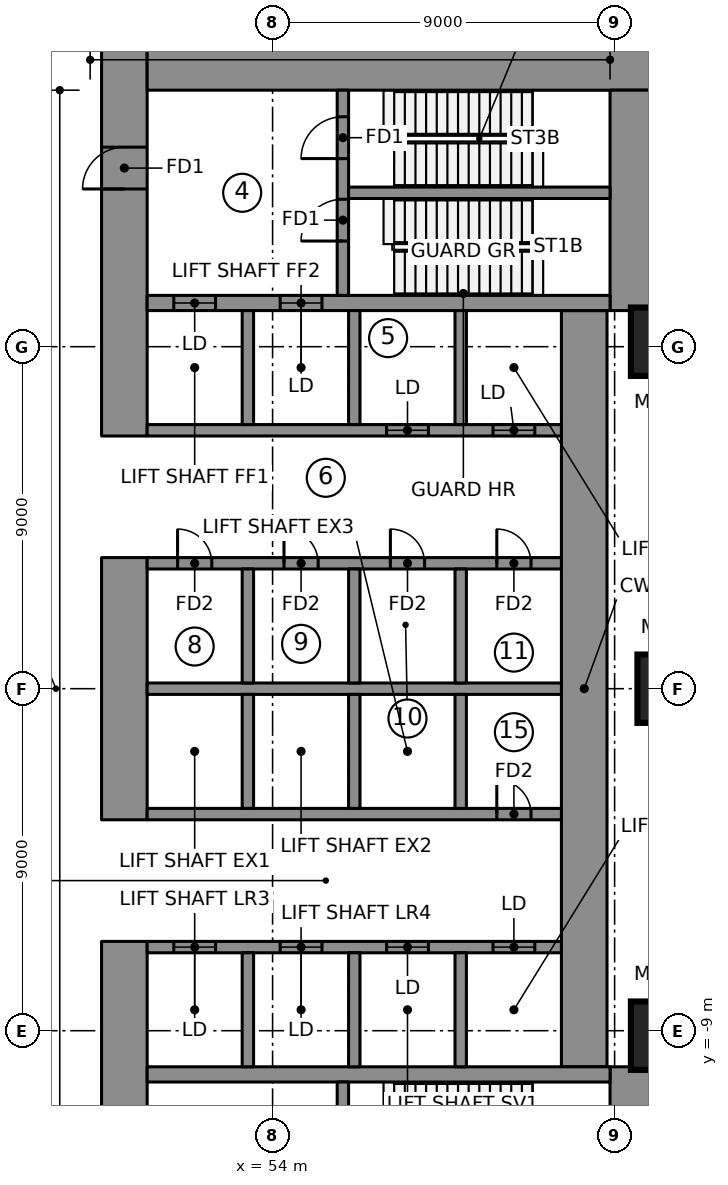
"""IFC4 building model, lengths in metres.
Left out: names, types, materials, properties, quantities, classifications, styles, units other than length and angle.
Written with IfcOpenShell. Run it as: python <this file> out.ifc"""

import sys

from ifc_helpers import new_model, si_unit, direction, frame, frame_2d, origin, origin_2d, place, context, subcontext, project, spatial, rectangle, extrude, element, fill, save


model = new_model("IFC4")
c1 = context("Model", 3, precision=1e-05, world=origin(), true_north=direction((0.0, 1.0)))
c2 = subcontext(c1, "Body", "Model", "MODEL_VIEW")
j1 = project(units=[si_unit("LENGTHUNIT", "METRE"), si_unit("PLANEANGLEUNIT", "RADIAN")], contexts=[c1])
p1 = place(None, origin())
s1 = spatial("IfcSite", under=j1, at=p1, CompositionType="ELEMENT")
p2 = place(p1, origin())
s2 = spatial("IfcBuilding", under=s1, at=p2, CompositionType="ELEMENT")
p3 = place(p2, frame((0.0, 0.0, 24.0)))
s3 = spatial("IfcBuildingStorey", under=s2, at=p3, CompositionType="ELEMENT", Elevation=24.0)
p4 = place(p3, frame((50.1, 6.65, 0.0), z_axis=(0.0, 0.0, 1.0), x_axis=(0.0, 1.0, 0.0)))
e1 = element("IfcWall", 1, at=p4, inside=s3, PredefinedType="SHEAR", context=c2, shape_type="SweptSolid", body=[
    extrude(rectangle(XDim=10.3, YDim=1.2, at=frame_2d((5.15, 0.0))), origin(), (0.0, 0.0, 1.0), 5.0),
])
p5 = place(p4, frame((6.5, 0.0, 0.0)))
e2 = element("IfcOpeningElement", 2, at=p5, cuts=e1, PredefinedType="OPENING", context=c2, shape_type="SweptSolid", body=[
    extrude(rectangle(XDim=1.1, YDim=2.1, at=frame_2d((0.55, 1.05))), frame((0.0, 0.61, 0.0), z_axis=(0.0, -1.0, 0.0), x_axis=(1.0, 0.0, 0.0)), (0.0, 0.0, 1.0), 1.22),
])
p6 = place(p3, frame((50.1, -3.45, 0.0), z_axis=(0.0, 0.0, 1.0), x_axis=(0.0, 1.0, 0.0)))
e3 = element("IfcWall", 3, at=p6, inside=s3, PredefinedType="SHEAR", context=c2, shape_type="SweptSolid", body=[
    extrude(rectangle(XDim=6.9, YDim=1.2, at=frame_2d((3.45, 0.0))), origin(), (0.0, 0.0, 1.0), 5.0),
])
p7 = place(p3, frame((50.1, -16.95, 0.0), z_axis=(0.0, 0.0, 1.0), x_axis=(0.0, 1.0, 0.0)))
e4 = element("IfcWall", 4, at=p7, inside=s3, PredefinedType="SHEAR", context=c2, shape_type="SweptSolid", body=[
    extrude(rectangle(XDim=10.3, YDim=1.2, at=frame_2d((5.15, 0.0))), origin(), (0.0, 0.0, 1.0), 5.0),
])
p8 = place(p7, frame((2.7, 0.0, 0.0)))
e5 = element("IfcOpeningElement", 5, at=p8, cuts=e4, PredefinedType="OPENING", context=c2, shape_type="SweptSolid", body=[
    extrude(rectangle(XDim=1.1, YDim=2.1, at=frame_2d((0.55, 1.05))), frame((0.0, 0.61, 0.0), z_axis=(0.0, -1.0, 0.0), x_axis=(1.0, 0.0, 0.0)), (0.0, 0.0, 1.0), 1.22),
])
p9 = place(p3, frame((50.7, 16.35, 0.0), z_axis=(0.0, 0.0, 1.0), x_axis=(1.0, 0.0, 0.0)))
e6 = element("IfcWall", 6, at=p9, inside=s3, PredefinedType="SHEAR", context=c2, shape_type="SweptSolid", body=[
    extrude(rectangle(XDim=13.38, YDim=1.2, at=frame_2d((6.69, 0.0))), origin(), (0.0, 0.0, 1.0), 5.0),
])
for number, where, z_axis, x_axis in (
    (7, (63.48, 9.95, 0.0), (0.0, 0.0, 1.0), (0.0, 1.0, 0.0)),
    (8, (63.48, -15.75, 0.0), (0.0, 0.0, 1.0), (0.0, 1.0, 0.0)),
):
    element("IfcWall", number, at=place(p3, frame(where, z_axis=z_axis, x_axis=x_axis)), inside=s3, PredefinedType="SHEAR", context=c2, shape_type="SweptSolid", body=[
        extrude(rectangle(XDim=5.8, YDim=1.2, at=frame_2d((2.9, 0.0))), origin(), (0.0, 0.0, 1.0), 5.0),
    ])
p10 = place(p3, frame((62.2, -9.95, 0.0), z_axis=(0.0, 0.0, 1.0), x_axis=(0.0, 1.0, 0.0)))
e9 = element("IfcWall", 9, at=p10, inside=s3, PredefinedType="SHEAR", context=c2, shape_type="SweptSolid", body=[
    extrude(rectangle(XDim=19.9, YDim=1.2, at=frame_2d((9.95, 0.0))), origin(), (0.0, 0.0, 1.0), 5.0),
])
p11 = place(p3, frame((50.7, 10.15, 0.0), z_axis=(0.0, 0.0, 1.0), x_axis=(1.0, 0.0, 0.0)))
e10 = element("IfcWall", 10, at=p11, inside=s3, PredefinedType="SHEAR", context=c2, shape_type="SweptSolid", body=[
    extrude(rectangle(XDim=12.18, YDim=0.4, at=frame_2d((6.09, 0.0))), origin(), (0.0, 0.0, 1.0), 5.0),
])
p12 = place(p11, frame((0.7, 0.0, 0.0)))
e11 = element("IfcOpeningElement", 11, at=p12, cuts=e10, PredefinedType="OPENING", context=c2, shape_type="SweptSolid", body=[
    extrude(rectangle(XDim=1.1, YDim=2.1, at=frame_2d((0.55, 1.05))), frame((0.0, 0.21, 0.0), z_axis=(0.0, -1.0, 0.0), x_axis=(1.0, 0.0, 0.0)), (0.0, 0.0, 1.0), 0.42),
])
p13 = place(p11, frame((3.5, 0.0, 0.0)))
e12 = element("IfcOpeningElement", 12, at=p13, cuts=e10, PredefinedType="OPENING", context=c2, shape_type="SweptSolid", body=[
    extrude(rectangle(XDim=1.1, YDim=2.1, at=frame_2d((0.55, 1.05))), frame((0.0, 0.21, 0.0), z_axis=(0.0, -1.0, 0.0), x_axis=(1.0, 0.0, 0.0)), (0.0, 0.0, 1.0), 0.42),
])
p14 = place(p3, frame((50.7, -10.15, 0.0), z_axis=(0.0, 0.0, 1.0), x_axis=(1.0, 0.0, 0.0)))
e13 = element("IfcWall", 13, at=p14, inside=s3, PredefinedType="SHEAR", context=c2, shape_type="SweptSolid", body=[
    extrude(rectangle(XDim=12.18, YDim=0.4, at=frame_2d((6.09, 0.0))), origin(), (0.0, 0.0, 1.0), 5.0),
])
p15 = place(p3, frame((50.7, 0.0, 0.0), z_axis=(0.0, 0.0, 1.0), x_axis=(1.0, 0.0, 0.0)))
e14 = element("IfcWall", 14, at=p15, inside=s3, PredefinedType="SHEAR", context=c2, shape_type="SweptSolid", body=[
    extrude(rectangle(XDim=10.9, YDim=0.3, at=frame_2d((5.45, 0.0))), origin(), (0.0, 0.0, 1.0), 5.0),
])
p16 = place(p3, frame((50.7, 3.3, 0.0), z_axis=(0.0, 0.0, 1.0), x_axis=(1.0, 0.0, 0.0)))
e15 = element("IfcWall", 15, at=p16, inside=s3, PredefinedType="SHEAR", context=c2, shape_type="SweptSolid", body=[
    extrude(rectangle(XDim=10.9, YDim=0.3, at=frame_2d((5.45, 0.0))), origin(), (0.0, 0.0, 1.0), 5.0),
])
p17 = place(p16, frame((0.8, 0.0, 0.0)))
e16 = element("IfcOpeningElement", 16, at=p17, cuts=e15, PredefinedType="OPENING", context=c2, shape_type="SweptSolid", body=[
    extrude(rectangle(XDim=0.9, YDim=2.1, at=frame_2d((0.45, 1.05))), frame((0.0, 0.16, 0.0), z_axis=(0.0, -1.0, 0.0), x_axis=(1.0, 0.0, 0.0)), (0.0, 0.0, 1.0), 0.32),
])
p18 = place(p16, frame((3.6, 0.0, 0.0)))
e17 = element("IfcOpeningElement", 17, at=p18, cuts=e15, PredefinedType="OPENING", context=c2, shape_type="SweptSolid", body=[
    extrude(rectangle(XDim=0.9, YDim=2.1, at=frame_2d((0.45, 1.05))), frame((0.0, 0.16, 0.0), z_axis=(0.0, -1.0, 0.0), x_axis=(1.0, 0.0, 0.0)), (0.0, 0.0, 1.0), 0.32),
])
p19 = place(p16, frame((6.4, 0.0, 0.0)))
e18 = element("IfcOpeningElement", 18, at=p19, cuts=e15, PredefinedType="OPENING", context=c2, shape_type="SweptSolid", body=[
    extrude(rectangle(XDim=0.9, YDim=2.1, at=frame_2d((0.45, 1.05))), frame((0.0, 0.16, 0.0), z_axis=(0.0, -1.0, 0.0), x_axis=(1.0, 0.0, 0.0)), (0.0, 0.0, 1.0), 0.32),
])
p20 = place(p16, frame((9.2, 0.0, 0.0)))
e19 = element("IfcOpeningElement", 19, at=p20, cuts=e15, PredefinedType="OPENING", context=c2, shape_type="SweptSolid", body=[
    extrude(rectangle(XDim=0.9, YDim=2.1, at=frame_2d((0.45, 1.05))), frame((0.0, 0.16, 0.0), z_axis=(0.0, -1.0, 0.0), x_axis=(1.0, 0.0, 0.0)), (0.0, 0.0, 1.0), 0.32),
])
p21 = place(p3, frame((50.7, 6.8, 0.0), z_axis=(0.0, 0.0, 1.0), x_axis=(1.0, 0.0, 0.0)))
e20 = element("IfcWall", 20, at=p21, inside=s3, PredefinedType="SHEAR", context=c2, shape_type="SweptSolid", body=[
    extrude(rectangle(XDim=10.9, YDim=0.3, at=frame_2d((5.45, 0.0))), origin(), (0.0, 0.0, 1.0), 5.0),
])
p22 = place(p21, frame((6.3, 0.0, 0.0)))
e21 = element("IfcOpeningElement", 21, at=p22, cuts=e20, PredefinedType="OPENING", context=c2, shape_type="SweptSolid", body=[
    extrude(rectangle(XDim=1.1, YDim=2.1, at=frame_2d((0.55, 1.05))), frame((0.0, 0.16, 0.0), z_axis=(0.0, -1.0, 0.0), x_axis=(1.0, 0.0, 0.0)), (0.0, 0.0, 1.0), 0.32),
])
p23 = place(p21, frame((9.1, 0.0, 0.0)))
e22 = element("IfcOpeningElement", 22, at=p23, cuts=e20, PredefinedType="OPENING", context=c2, shape_type="SweptSolid", body=[
    extrude(rectangle(XDim=1.1, YDim=2.1, at=frame_2d((0.55, 1.05))), frame((0.0, 0.16, 0.0), z_axis=(0.0, -1.0, 0.0), x_axis=(1.0, 0.0, 0.0)), (0.0, 0.0, 1.0), 0.32),
])
for number, where, z_axis, x_axis in (
    (23, (53.35, 0.15, 0.0), (0.0, 0.0, 1.0), (0.0, 1.0, 0.0)),
    (24, (53.35, 6.95, 0.0), (0.0, 0.0, 1.0), (0.0, 1.0, 0.0)),
    (25, (56.15, 0.15, 0.0), (0.0, 0.0, 1.0), (0.0, 1.0, 0.0)),
    (26, (56.15, 6.95, 0.0), (0.0, 0.0, 1.0), (0.0, 1.0, 0.0)),
    (27, (58.95, 0.15, 0.0), (0.0, 0.0, 1.0), (0.0, 1.0, 0.0)),
    (28, (58.95, 6.95, 0.0), (0.0, 0.0, 1.0), (0.0, 1.0, 0.0)),
):
    element("IfcWall", number, at=place(p3, frame(where, z_axis=z_axis, x_axis=x_axis)), inside=s3, PredefinedType="SHEAR", context=c2, shape_type="SweptSolid", body=[
        extrude(rectangle(XDim=3.0, YDim=0.3, at=frame_2d((1.5, 0.0))), origin(), (0.0, 0.0, 1.0), 5.0),
    ])
p24 = place(p3, frame((50.7, -3.3, 0.0), z_axis=(0.0, 0.0, 1.0), x_axis=(1.0, 0.0, 0.0)))
e29 = element("IfcWall", 29, at=p24, inside=s3, PredefinedType="SHEAR", context=c2, shape_type="SweptSolid", body=[
    extrude(rectangle(XDim=10.9, YDim=0.3, at=frame_2d((5.45, 0.0))), origin(), (0.0, 0.0, 1.0), 5.0),
])
p25 = place(p24, frame((9.2, 0.0, 0.0)))
e30 = element("IfcOpeningElement", 30, at=p25, cuts=e29, PredefinedType="OPENING", context=c2, shape_type="SweptSolid", body=[
    extrude(rectangle(XDim=0.9, YDim=2.1, at=frame_2d((0.45, 1.05))), frame((0.0, 0.16, 0.0), z_axis=(0.0, -1.0, 0.0), x_axis=(1.0, 0.0, 0.0)), (0.0, 0.0, 1.0), 0.32),
])
p26 = place(p3, frame((50.7, -6.8, 0.0), z_axis=(0.0, 0.0, 1.0), x_axis=(1.0, 0.0, 0.0)))
e31 = element("IfcWall", 31, at=p26, inside=s3, PredefinedType="SHEAR", context=c2, shape_type="SweptSolid", body=[
    extrude(rectangle(XDim=10.9, YDim=0.3, at=frame_2d((5.45, 0.0))), origin(), (0.0, 0.0, 1.0), 5.0),
])
p27 = place(p26, frame((0.7, 0.0, 0.0)))
e32 = element("IfcOpeningElement", 32, at=p27, cuts=e31, PredefinedType="OPENING", context=c2, shape_type="SweptSolid", body=[
    extrude(rectangle(XDim=1.1, YDim=2.1, at=frame_2d((0.55, 1.05))), frame((0.0, 0.16, 0.0), z_axis=(0.0, -1.0, 0.0), x_axis=(1.0, 0.0, 0.0)), (0.0, 0.0, 1.0), 0.32),
])
p28 = place(p26, frame((3.5, 0.0, 0.0)))
e33 = element("IfcOpeningElement", 33, at=p28, cuts=e31, PredefinedType="OPENING", context=c2, shape_type="SweptSolid", body=[
    extrude(rectangle(XDim=1.1, YDim=2.1, at=frame_2d((0.55, 1.05))), frame((0.0, 0.16, 0.0), z_axis=(0.0, -1.0, 0.0), x_axis=(1.0, 0.0, 0.0)), (0.0, 0.0, 1.0), 0.32),
])
p29 = place(p26, frame((6.3, 0.0, 0.0)))
e34 = element("IfcOpeningElement", 34, at=p29, cuts=e31, PredefinedType="OPENING", context=c2, shape_type="SweptSolid", body=[
    extrude(rectangle(XDim=1.1, YDim=2.1, at=frame_2d((0.55, 1.05))), frame((0.0, 0.16, 0.0), z_axis=(0.0, -1.0, 0.0), x_axis=(1.0, 0.0, 0.0)), (0.0, 0.0, 1.0), 0.32),
])
p30 = place(p26, frame((9.1, 0.0, 0.0)))
e35 = element("IfcOpeningElement", 35, at=p30, cuts=e31, PredefinedType="OPENING", context=c2, shape_type="SweptSolid", body=[
    extrude(rectangle(XDim=1.1, YDim=2.1, at=frame_2d((0.55, 1.05))), frame((0.0, 0.16, 0.0), z_axis=(0.0, -1.0, 0.0), x_axis=(1.0, 0.0, 0.0)), (0.0, 0.0, 1.0), 0.32),
])
for number, where, z_axis, x_axis in (
    (36, (53.35, -3.15, 0.0), (0.0, 0.0, 1.0), (0.0, 1.0, 0.0)),
    (37, (53.35, -9.95, 0.0), (0.0, 0.0, 1.0), (0.0, 1.0, 0.0)),
    (38, (56.15, -3.15, 0.0), (0.0, 0.0, 1.0), (0.0, 1.0, 0.0)),
    (39, (56.15, -9.95, 0.0), (0.0, 0.0, 1.0), (0.0, 1.0, 0.0)),
    (40, (58.95, -3.15, 0.0), (0.0, 0.0, 1.0), (0.0, 1.0, 0.0)),
    (41, (58.95, -9.95, 0.0), (0.0, 0.0, 1.0), (0.0, 1.0, 0.0)),
):
    element("IfcWall", number, at=place(p3, frame(where, z_axis=z_axis, x_axis=x_axis)), inside=s3, PredefinedType="SHEAR", context=c2, shape_type="SweptSolid", body=[
        extrude(rectangle(XDim=3.0, YDim=0.3, at=frame_2d((1.5, 0.0))), origin(), (0.0, 0.0, 1.0), 5.0),
    ])
p31 = place(p3, frame((55.85, 10.35, 0.0), z_axis=(0.0, 0.0, 1.0), x_axis=(0.0, 1.0, 0.0)))
e42 = element("IfcWall", 42, at=p31, inside=s3, PredefinedType="SHEAR", context=c2, shape_type="SweptSolid", body=[
    extrude(rectangle(XDim=5.4, YDim=0.3, at=frame_2d((2.7, 0.0))), origin(), (0.0, 0.0, 1.0), 5.0),
])
p32 = place(p31, frame((1.43, 0.0, 0.0)))
e43 = element("IfcOpeningElement", 43, at=p32, cuts=e42, PredefinedType="OPENING", context=c2, shape_type="SweptSolid", body=[
    extrude(rectangle(XDim=1.1, YDim=2.1, at=frame_2d((0.55, 1.05))), frame((0.0, 0.16, 0.0), z_axis=(0.0, -1.0, 0.0), x_axis=(1.0, 0.0, 0.0)), (0.0, 0.0, 1.0), 0.32),
])
p33 = place(p31, frame((3.6, 0.0, 0.0)))
e44 = element("IfcOpeningElement", 44, at=p33, cuts=e42, PredefinedType="OPENING", context=c2, shape_type="SweptSolid", body=[
    extrude(rectangle(XDim=1.1, YDim=2.1, at=frame_2d((0.55, 1.05))), frame((0.0, 0.16, 0.0), z_axis=(0.0, -1.0, 0.0), x_axis=(1.0, 0.0, 0.0)), (0.0, 0.0, 1.0), 0.32),
])
p34 = place(p3, frame((55.85, -15.75, 0.0), z_axis=(0.0, 0.0, 1.0), x_axis=(0.0, 1.0, 0.0)))
e45 = element("IfcWall", 45, at=p34, inside=s3, PredefinedType="SHEAR", context=c2, shape_type="SweptSolid", body=[
    extrude(rectangle(XDim=5.4, YDim=0.3, at=frame_2d((2.7, 0.0))), origin(), (0.0, 0.0, 1.0), 5.0),
])
p35 = place(p34, frame((3.6, 0.0, 0.0)))
e46 = element("IfcOpeningElement", 46, at=p35, cuts=e45, PredefinedType="OPENING", context=c2, shape_type="SweptSolid", body=[
    extrude(rectangle(XDim=1.1, YDim=2.1, at=frame_2d((0.55, 1.05))), frame((0.0, 0.16, 0.0), z_axis=(0.0, -1.0, 0.0), x_axis=(1.0, 0.0, 0.0)), (0.0, 0.0, 1.0), 0.32),
])
p36 = place(p34, frame((0.8, 0.0, 0.0)))
e47 = element("IfcOpeningElement", 47, at=p36, cuts=e45, PredefinedType="OPENING", context=c2, shape_type="SweptSolid", body=[
    extrude(rectangle(XDim=0.9, YDim=2.1, at=frame_2d((0.45, 1.05))), frame((0.0, 0.16, 0.0), z_axis=(0.0, -1.0, 0.0), x_axis=(1.0, 0.0, 0.0)), (0.0, 0.0, 1.0), 0.32),
])
p37 = place(p3, frame((56.0, 13.05, 0.0), z_axis=(0.0, 0.0, 1.0), x_axis=(1.0, 0.0, 0.0)))
e48 = element("IfcWall", 48, at=p37, inside=s3, PredefinedType="SHEAR", context=c2, shape_type="SweptSolid", body=[
    extrude(rectangle(XDim=6.88, YDim=0.3, at=frame_2d((3.44, 0.0))), origin(), (0.0, 0.0, 1.0), 5.0),
])
for number, where, z_axis, x_axis in (
    (49, (64.328, -9.131, 0.0), (0.0, 0.0, 1.0), (1.0, 0.0, 0.0)),
    (50, (64.5, 0.0, 0.0), (0.0, 0.0, 1.0), (1.0, 0.0, 0.0)),
    (51, (64.328, 9.131, 0.0), (0.0, 0.0, 1.0), (1.0, 0.0, 0.0)),
):
    element("IfcColumn", number, at=place(p3, frame(where, z_axis=z_axis, x_axis=x_axis)), inside=s3, PredefinedType="COLUMN", context=c2, shape_type="SweptSolid", body=[
        extrude(rectangle(XDim=1.8, YDim=1.8, at=origin_2d()), origin(), (0.0, 0.0, 1.0), 5.0),
    ])
p38 = place(p12, origin())
e52 = element("IfcDoor", 52, at=p38, inside=s3, OperationType="DOUBLE_DOOR_SLIDING", PredefinedType="DOOR", context=c2, shape_type="SweptSolid", body=[
    extrude(rectangle(XDim=1.1, YDim=2.1, at=frame_2d((0.55, 1.05))), frame((0.0, 0.025, 0.0), z_axis=(0.0, -1.0, 0.0), x_axis=(1.0, 0.0, 0.0)), (0.0, 0.0, 1.0), 0.05),
])
fill(e11, e52)
p39 = place(p13, origin())
e53 = element("IfcDoor", 53, at=p39, inside=s3, OperationType="DOUBLE_DOOR_SLIDING", PredefinedType="DOOR", context=c2, shape_type="SweptSolid", body=[
    extrude(rectangle(XDim=1.1, YDim=2.1, at=frame_2d((0.55, 1.05))), frame((0.0, 0.025, 0.0), z_axis=(0.0, -1.0, 0.0), x_axis=(1.0, 0.0, 0.0)), (0.0, 0.0, 1.0), 0.05),
])
fill(e12, e53)
p40 = place(p22, origin())
e54 = element("IfcDoor", 54, at=p40, inside=s3, OperationType="DOUBLE_DOOR_SLIDING", PredefinedType="DOOR", context=c2, shape_type="SweptSolid", body=[
    extrude(rectangle(XDim=1.1, YDim=2.1, at=frame_2d((0.55, 1.05))), frame((0.0, 0.025, 0.0), z_axis=(0.0, -1.0, 0.0), x_axis=(1.0, 0.0, 0.0)), (0.0, 0.0, 1.0), 0.05),
])
fill(e21, e54)
p41 = place(p23, origin())
e55 = element("IfcDoor", 55, at=p41, inside=s3, OperationType="DOUBLE_DOOR_SLIDING", PredefinedType="DOOR", context=c2, shape_type="SweptSolid", body=[
    extrude(rectangle(XDim=1.1, YDim=2.1, at=frame_2d((0.55, 1.05))), frame((0.0, 0.025, 0.0), z_axis=(0.0, -1.0, 0.0), x_axis=(1.0, 0.0, 0.0)), (0.0, 0.0, 1.0), 0.05),
])
fill(e22, e55)
p42 = place(p27, origin())
e56 = element("IfcDoor", 56, at=p42, inside=s3, OperationType="DOUBLE_DOOR_SLIDING", PredefinedType="DOOR", context=c2, shape_type="SweptSolid", body=[
    extrude(rectangle(XDim=1.1, YDim=2.1, at=frame_2d((0.55, 1.05))), frame((0.0, 0.025, 0.0), z_axis=(0.0, -1.0, 0.0), x_axis=(1.0, 0.0, 0.0)), (0.0, 0.0, 1.0), 0.05),
])
fill(e32, e56)
p43 = place(p28, origin())
e57 = element("IfcDoor", 57, at=p43, inside=s3, OperationType="DOUBLE_DOOR_SLIDING", PredefinedType="DOOR", context=c2, shape_type="SweptSolid", body=[
    extrude(rectangle(XDim=1.1, YDim=2.1, at=frame_2d((0.55, 1.05))), frame((0.0, 0.025, 0.0), z_axis=(0.0, -1.0, 0.0), x_axis=(1.0, 0.0, 0.0)), (0.0, 0.0, 1.0), 0.05),
])
fill(e33, e57)
p44 = place(p29, origin())
e58 = element("IfcDoor", 58, at=p44, inside=s3, OperationType="DOUBLE_DOOR_SLIDING", PredefinedType="DOOR", context=c2, shape_type="SweptSolid", body=[
    extrude(rectangle(XDim=1.1, YDim=2.1, at=frame_2d((0.55, 1.05))), frame((0.0, 0.025, 0.0), z_axis=(0.0, -1.0, 0.0), x_axis=(1.0, 0.0, 0.0)), (0.0, 0.0, 1.0), 0.05),
])
fill(e34, e58)
p45 = place(p30, origin())
e59 = element("IfcDoor", 59, at=p45, inside=s3, OperationType="DOUBLE_DOOR_SLIDING", PredefinedType="DOOR", context=c2, shape_type="SweptSolid", body=[
    extrude(rectangle(XDim=1.1, YDim=2.1, at=frame_2d((0.55, 1.05))), frame((0.0, 0.025, 0.0), z_axis=(0.0, -1.0, 0.0), x_axis=(1.0, 0.0, 0.0)), (0.0, 0.0, 1.0), 0.05),
])
fill(e35, e59)
p46 = place(p32, origin())
e60 = element("IfcDoor", 60, at=p46, inside=s3, OperationType="SINGLE_SWING_RIGHT", PredefinedType="DOOR", context=c2, shape_type="SweptSolid", body=[
    extrude(rectangle(XDim=1.1, YDim=2.1, at=frame_2d((0.55, 1.05))), frame((0.0, 0.025, 0.0), z_axis=(0.0, -1.0, 0.0), x_axis=(1.0, 0.0, 0.0)), (0.0, 0.0, 1.0), 0.05),
])
fill(e43, e60)
p47 = place(p33, origin())
e61 = element("IfcDoor", 61, at=p47, inside=s3, OperationType="SINGLE_SWING_RIGHT", PredefinedType="DOOR", context=c2, shape_type="SweptSolid", body=[
    extrude(rectangle(XDim=1.1, YDim=2.1, at=frame_2d((0.55, 1.05))), frame((0.0, 0.025, 0.0), z_axis=(0.0, -1.0, 0.0), x_axis=(1.0, 0.0, 0.0)), (0.0, 0.0, 1.0), 0.05),
])
fill(e44, e61)
p48 = place(p5, origin())
e62 = element("IfcDoor", 62, at=p48, inside=s3, OperationType="SINGLE_SWING_RIGHT", PredefinedType="DOOR", context=c2, shape_type="SweptSolid", body=[
    extrude(rectangle(XDim=1.1, YDim=2.1, at=frame_2d((0.55, 1.05))), frame((0.0, 0.025, 0.0), z_axis=(0.0, -1.0, 0.0), x_axis=(1.0, 0.0, 0.0)), (0.0, 0.0, 1.0), 0.05),
])
fill(e2, e62)
p49 = place(p17, origin())
e63 = element("IfcDoor", 63, at=p49, inside=s3, OperationType="SINGLE_SWING_LEFT", PredefinedType="DOOR", context=c2, shape_type="SweptSolid", body=[
    extrude(rectangle(XDim=0.9, YDim=2.1, at=frame_2d((0.45, 1.05))), frame((0.0, 0.025, 0.0), z_axis=(0.0, -1.0, 0.0), x_axis=(1.0, 0.0, 0.0)), (0.0, 0.0, 1.0), 0.05),
])
fill(e16, e63)
p50 = place(p18, origin())
e64 = element("IfcDoor", 64, at=p50, inside=s3, OperationType="SINGLE_SWING_LEFT", PredefinedType="DOOR", context=c2, shape_type="SweptSolid", body=[
    extrude(rectangle(XDim=0.9, YDim=2.1, at=frame_2d((0.45, 1.05))), frame((0.0, 0.025, 0.0), z_axis=(0.0, -1.0, 0.0), x_axis=(1.0, 0.0, 0.0)), (0.0, 0.0, 1.0), 0.05),
])
fill(e17, e64)
p51 = place(p19, origin())
e65 = element("IfcDoor", 65, at=p51, inside=s3, OperationType="SINGLE_SWING_LEFT", PredefinedType="DOOR", context=c2, shape_type="SweptSolid", body=[
    extrude(rectangle(XDim=0.9, YDim=2.1, at=frame_2d((0.45, 1.05))), frame((0.0, 0.025, 0.0), z_axis=(0.0, -1.0, 0.0), x_axis=(1.0, 0.0, 0.0)), (0.0, 0.0, 1.0), 0.05),
])
fill(e18, e65)
p52 = place(p20, origin())
e66 = element("IfcDoor", 66, at=p52, inside=s3, OperationType="SINGLE_SWING_LEFT", PredefinedType="DOOR", context=c2, shape_type="SweptSolid", body=[
    extrude(rectangle(XDim=0.9, YDim=2.1, at=frame_2d((0.45, 1.05))), frame((0.0, 0.025, 0.0), z_axis=(0.0, -1.0, 0.0), x_axis=(1.0, 0.0, 0.0)), (0.0, 0.0, 1.0), 0.05),
])
fill(e19, e66)
p53 = place(p25, origin())
e67 = element("IfcDoor", 67, at=p53, inside=s3, OperationType="SINGLE_SWING_LEFT", PredefinedType="DOOR", context=c2, shape_type="SweptSolid", body=[
    extrude(rectangle(XDim=0.9, YDim=2.1, at=frame_2d((0.45, 1.05))), frame((0.0, 0.025, 0.0), z_axis=(0.0, -1.0, 0.0), x_axis=(1.0, 0.0, 0.0)), (0.0, 0.0, 1.0), 0.05),
])
fill(e30, e67)
save(model, sys.argv[1])
